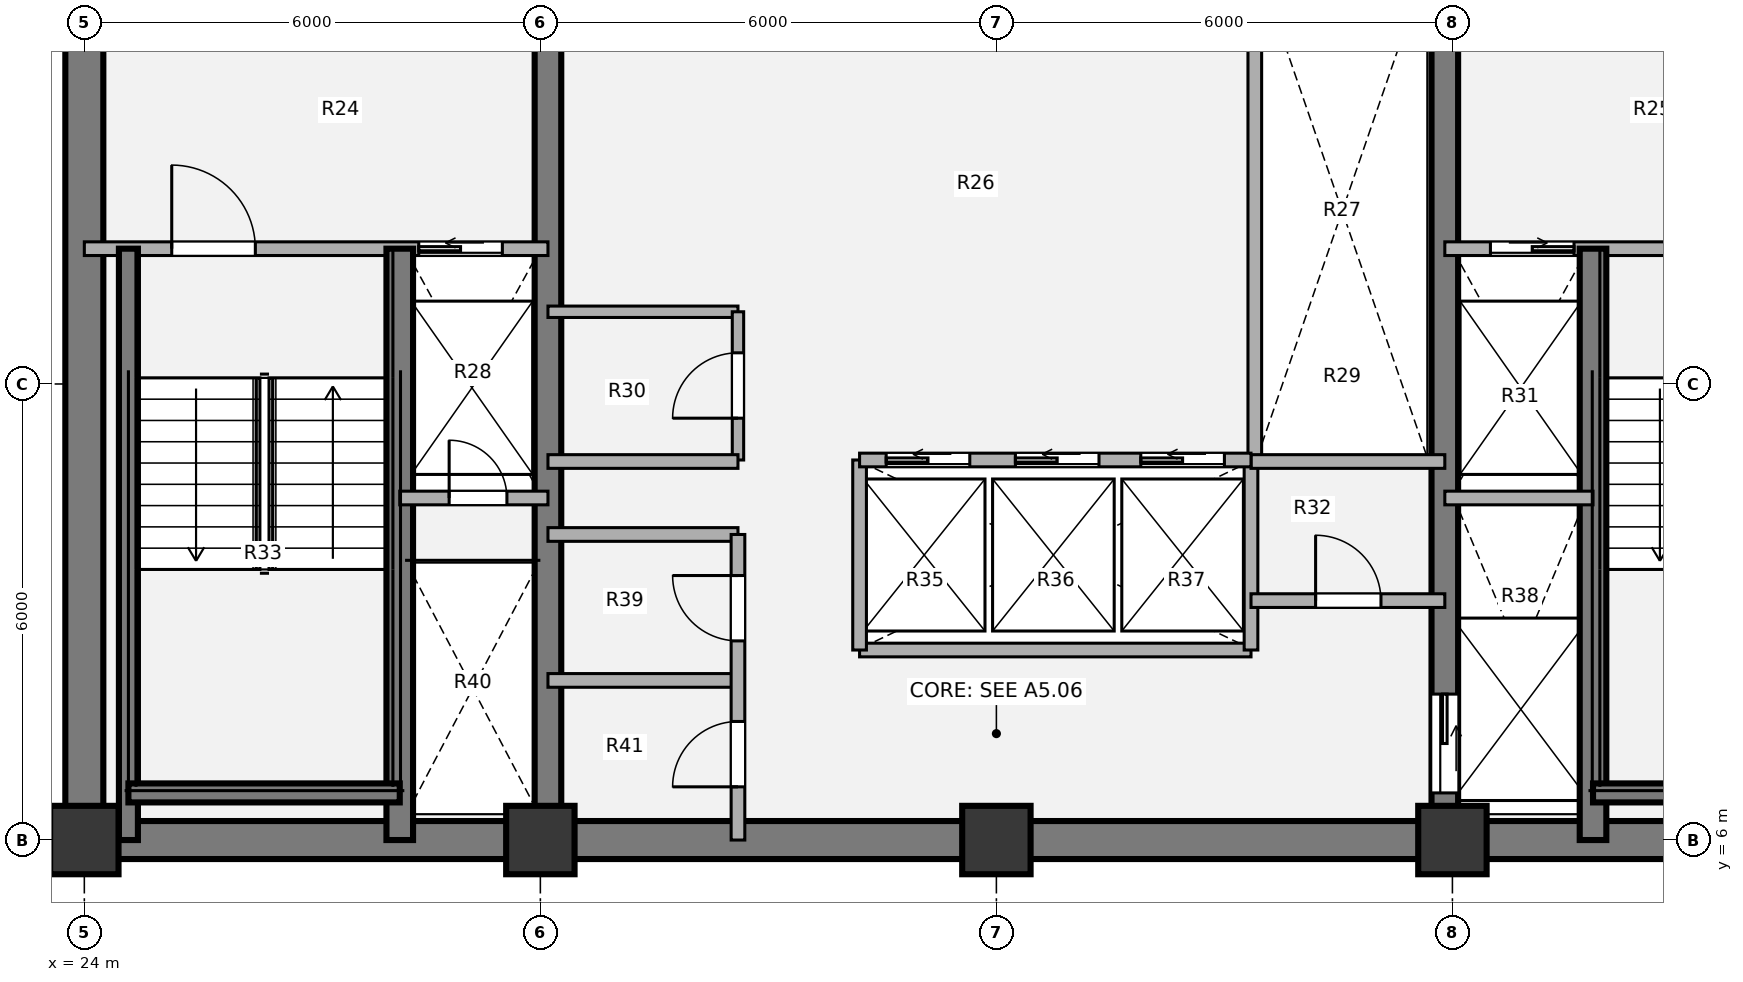
"""IFC4 building model, lengths in metres.
Left out: names, types, materials, properties, quantities, classifications, styles, units other than length and angle.
Written with IfcOpenShell. Run it as: python <this file> out.ifc"""

import sys

from ifc_helpers import new_model, si_unit, direction, frame, frame_2d, origin, origin_2d, place, context, subcontext, project, spatial, rectangle, extrude, source, transform, mapped, element, fill, save


model = new_model("IFC4")
c1 = context("Model", 3, precision=1e-05, world=origin(), true_north=direction((0.0, 1.0)))
c2 = subcontext(c1, "Body", "Model", "MODEL_VIEW")
j1 = project(units=[si_unit("LENGTHUNIT", "METRE"), si_unit("PLANEANGLEUNIT", "RADIAN")], contexts=[c1])
p1 = place(None, origin())
s1 = spatial("IfcSite", under=j1, at=p1, CompositionType="ELEMENT")
p2 = place(p1, origin())
s2 = spatial("IfcBuilding", under=s1, at=p2, CompositionType="ELEMENT")
p3 = place(p2, frame((0.0, 0.0, 93.6)))
s3 = spatial("IfcBuildingStorey", under=s2, at=p3, CompositionType="ELEMENT", Elevation=93.6)
m1 = source(origin(), c2, "Body", "SweptSolid", [
    extrude(rectangle(XDim=0.9, YDim=0.9, at=origin_2d()), origin(), (0.0, 0.0, 1.0), 3.78),
])
for number, where, z_axis, x_axis in (
    (1, (24.0, 6.0, 0.0), (0.0, 0.0, 1.0), (1.0, 0.0, 0.0)),
    (2, (30.0, 6.0, 0.0), (0.0, 0.0, 1.0), (1.0, 0.0, 0.0)),
    (3, (36.0, 6.0, 0.0), (0.0, 0.0, 1.0), (1.0, 0.0, 0.0)),
    (4, (42.0, 6.0, 0.0), (0.0, 0.0, 1.0), (1.0, 0.0, 0.0)),
):
    element("IfcColumn", number, at=place(p3, frame(where, z_axis=z_axis, x_axis=x_axis)), inside=s3, PredefinedType="COLUMN", context=c2, shape_type="MappedRepresentation", body=[
        mapped(m1, transform((0.0, 0.0, 0.0), x_axis=(1.0, 0.0, 0.0), y_axis=(0.0, 1.0, 0.0), z_axis=(0.0, 0.0, 1.0), scale=1.0)),
    ])
p4 = place(p3, frame((48.25, 6.0, 0.0), z_axis=(0.0, 0.0, 1.0), x_axis=(-1.0, 0.0, 0.0)))
e5 = element("IfcWall", 5, at=p4, inside=s3, PredefinedType="SHEAR", context=c2, shape_type="SweptSolid", body=[
    extrude(rectangle(XDim=24.5, YDim=0.5, at=frame_2d((12.25, 0.0))), origin(), (0.0, 0.0, 1.0), 3.78),
])
p5 = place(p3, frame((24.0, 6.0, 0.0), z_axis=(0.0, 0.0, 1.0), x_axis=(0.0, 1.0, 0.0)))
e6 = element("IfcWall", 6, at=p5, inside=s3, PredefinedType="SHEAR", context=c2, shape_type="SweptSolid", body=[
    extrude(rectangle(XDim=12.0, YDim=0.5, at=frame_2d((6.0, 0.0))), origin(), (0.0, 0.0, 1.0), 3.78),
])
p6 = place(p3, frame((30.1, 6.0, 0.0), z_axis=(0.0, 0.0, 1.0), x_axis=(0.0, 1.0, 0.0)))
e7 = element("IfcWall", 7, at=p6, inside=s3, PredefinedType="SHEAR", context=c2, shape_type="SweptSolid", body=[
    extrude(rectangle(XDim=12.0, YDim=0.35, at=frame_2d((6.0, 0.0))), origin(), (0.0, 0.0, 1.0), 3.78),
])
p7 = place(p3, frame((41.9, 18.0, 0.0), z_axis=(0.0, 0.0, 1.0), x_axis=(0.0, -1.0, 0.0)))
e8 = element("IfcWall", 8, at=p7, inside=s3, PredefinedType="SHEAR", context=c2, shape_type="SweptSolid", body=[
    extrude(rectangle(XDim=12.0, YDim=0.35, at=frame_2d((6.0, 0.0))), origin(), (0.0, 0.0, 1.0), 3.78),
])
p8 = place(p7, frame((10.08, 0.0, 0.0)))
e9 = element("IfcOpeningElement", 9, at=p8, cuts=e8, PredefinedType="OPENING", context=c2, shape_type="SweptSolid", body=[
    extrude(rectangle(XDim=1.3, YDim=2.1, at=origin_2d()), frame((0.65, 0.185, 1.05), z_axis=(0.0, -1.0, 0.0), x_axis=(1.0, 0.0, 0.0)), (0.0, 0.0, 1.0), 0.37),
])
p9 = place(p3, frame((30.1, 12.95, 0.0), z_axis=(0.0, 0.0, 1.0), x_axis=(1.0, 0.0, 0.0)))
e10 = element("IfcWall", 10, at=p9, inside=s3, PredefinedType="PARTITIONING", context=c2, shape_type="SweptSolid", body=[
    extrude(rectangle(XDim=2.5, YDim=0.15, at=frame_2d((1.25, 0.0))), origin(), (0.0, 0.0, 1.0), 3.5),
])
p10 = place(p3, frame((32.6, 11.0, 0.0), z_axis=(0.0, 0.0, 1.0), x_axis=(0.0, 1.0, 0.0)))
e11 = element("IfcWall", 11, at=p10, inside=s3, PredefinedType="PARTITIONING", context=c2, shape_type="SweptSolid", body=[
    extrude(rectangle(XDim=1.95, YDim=0.15, at=frame_2d((0.975, 0.0))), origin(), (0.0, 0.0, 1.0), 3.5),
])
p11 = place(p10, frame((0.55, 0.0, 0.0)))
e12 = element("IfcOpeningElement", 12, at=p11, cuts=e11, PredefinedType="OPENING", context=c2, shape_type="SweptSolid", body=[
    extrude(rectangle(XDim=0.86, YDim=2.1, at=origin_2d()), frame((0.43, 0.085, 1.05), z_axis=(0.0, -1.0, 0.0), x_axis=(1.0, 0.0, 0.0)), (0.0, 0.0, 1.0), 0.17),
])
p12 = place(p3, frame((34.2, 8.5, 0.0), z_axis=(0.0, 0.0, 1.0), x_axis=(1.0, 0.0, 0.0)))
e13 = element("IfcWall", 13, at=p12, inside=s3, PredefinedType="PARTITIONING", context=c2, shape_type="SweptSolid", body=[
    extrude(rectangle(XDim=5.15, YDim=0.18, at=frame_2d((2.575, 0.0))), origin(), (0.0, 0.0, 1.0), 3.5),
])
for number, where, z_axis, x_axis in (
    (14, (34.2, 8.5, 0.0), (0.0, 0.0, 1.0), (0.0, 1.0, 0.0)),
    (15, (39.35, 8.5, 0.0), (0.0, 0.0, 1.0), (0.0, 1.0, 0.0)),
):
    element("IfcWall", number, at=place(p3, frame(where, z_axis=z_axis, x_axis=x_axis)), inside=s3, PredefinedType="PARTITIONING", context=c2, shape_type="SweptSolid", body=[
        extrude(rectangle(XDim=2.5, YDim=0.18, at=frame_2d((1.25, 0.0))), origin(), (0.0, 0.0, 1.0), 3.5),
    ])
p13 = place(p3, frame((39.4, 11.0, 0.0), z_axis=(0.0, 0.0, 1.0), x_axis=(0.0, 1.0, 0.0)))
e16 = element("IfcWall", 16, at=p13, inside=s3, PredefinedType="PARTITIONING", context=c2, shape_type="SweptSolid", body=[
    extrude(rectangle(XDim=7.0, YDim=0.18, at=frame_2d((3.5, 0.0))), origin(), (0.0, 0.0, 1.0), 3.5),
])
p14 = place(p3, frame((30.1, 10.98, 0.0), z_axis=(0.0, 0.0, 1.0), x_axis=(1.0, 0.0, 0.0)))
e17 = element("IfcWall", 17, at=p14, inside=s3, PredefinedType="PARTITIONING", context=c2, shape_type="SweptSolid", body=[
    extrude(rectangle(XDim=2.5, YDim=0.18, at=frame_2d((1.25, 0.0))), origin(), (0.0, 0.0, 1.0), 3.5),
])
p15 = place(p3, frame((39.35, 10.98, 0.0), z_axis=(0.0, 0.0, 1.0), x_axis=(1.0, 0.0, 0.0)))
e18 = element("IfcWall", 18, at=p15, inside=s3, PredefinedType="PARTITIONING", context=c2, shape_type="SweptSolid", body=[
    extrude(rectangle(XDim=2.55, YDim=0.18, at=frame_2d((1.275, 0.0))), origin(), (0.0, 0.0, 1.0), 3.5),
])
for number, where, z_axis, x_axis in (
    (19, (30.1, 8.1, 0.0), (0.0, 0.0, 1.0), (1.0, 0.0, 0.0)),
    (20, (30.1, 10.02, 0.0), (0.0, 0.0, 1.0), (1.0, 0.0, 0.0)),
):
    element("IfcWall", number, at=place(p3, frame(where, z_axis=z_axis, x_axis=x_axis)), inside=s3, PredefinedType="PARTITIONING", context=c2, shape_type="SweptSolid", body=[
        extrude(rectangle(XDim=2.5, YDim=0.18, at=frame_2d((1.25, 0.0))), origin(), (0.0, 0.0, 1.0), 3.5),
    ])
p16 = place(p3, frame((32.6, 6.0, 0.0), z_axis=(0.0, 0.0, 1.0), x_axis=(0.0, 1.0, 0.0)))
e21 = element("IfcWall", 21, at=p16, inside=s3, PredefinedType="PARTITIONING", context=c2, shape_type="SweptSolid", body=[
    extrude(rectangle(XDim=4.02, YDim=0.18, at=frame_2d((2.01, 0.0))), origin(), (0.0, 0.0, 1.0), 3.5),
])
p17 = place(p16, frame((0.7, 0.0, 0.0)))
e22 = element("IfcOpeningElement", 22, at=p17, cuts=e21, PredefinedType="OPENING", context=c2, shape_type="SweptSolid", body=[
    extrude(rectangle(XDim=0.86, YDim=2.1, at=origin_2d()), frame((0.43, 0.1, 1.05), z_axis=(0.0, -1.0, 0.0), x_axis=(1.0, 0.0, 0.0)), (0.0, 0.0, 1.0), 0.2),
])
p18 = place(p16, frame((2.62, 0.0, 0.0)))
e23 = element("IfcOpeningElement", 23, at=p18, cuts=e21, PredefinedType="OPENING", context=c2, shape_type="SweptSolid", body=[
    extrude(rectangle(XDim=0.86, YDim=2.1, at=origin_2d()), frame((0.43, 0.1, 1.05), z_axis=(0.0, -1.0, 0.0), x_axis=(1.0, 0.0, 0.0)), (0.0, 0.0, 1.0), 0.2),
])
p19 = place(p3, frame((39.35, 9.15, 0.0), z_axis=(0.0, 0.0, 1.0), x_axis=(1.0, 0.0, 0.0)))
e24 = element("IfcWall", 24, at=p19, inside=s3, PredefinedType="PARTITIONING", context=c2, shape_type="SweptSolid", body=[
    extrude(rectangle(XDim=2.55, YDim=0.18, at=frame_2d((1.275, 0.0))), origin(), (0.0, 0.0, 1.0), 3.5),
])
p20 = place(p19, frame((0.85, 0.0, 0.0)))
e25 = element("IfcOpeningElement", 25, at=p20, cuts=e24, PredefinedType="OPENING", context=c2, shape_type="SweptSolid", body=[
    extrude(rectangle(XDim=0.86, YDim=2.1, at=origin_2d()), frame((0.43, 0.1, 1.05), z_axis=(0.0, -1.0, 0.0), x_axis=(1.0, 0.0, 0.0)), (0.0, 0.0, 1.0), 0.2),
])
p21 = place(p3, frame((24.0, 13.78, 0.0), z_axis=(0.0, 0.0, 1.0), x_axis=(1.0, 0.0, 0.0)))
e26 = element("IfcWall", 26, at=p21, inside=s3, PredefinedType="PARTITIONING", context=c2, shape_type="SweptSolid", body=[
    extrude(rectangle(XDim=6.1, YDim=0.18, at=frame_2d((3.05, 0.0))), origin(), (0.0, 0.0, 1.0), 3.5),
])
p22 = place(p21, frame((1.15, 0.0, 0.0)))
e27 = element("IfcOpeningElement", 27, at=p22, cuts=e26, PredefinedType="OPENING", context=c2, shape_type="SweptSolid", body=[
    extrude(rectangle(XDim=1.1, YDim=2.1, at=origin_2d()), frame((0.55, 0.1, 1.05), z_axis=(0.0, -1.0, 0.0), x_axis=(1.0, 0.0, 0.0)), (0.0, 0.0, 1.0), 0.2),
])
p23 = place(p21, frame((4.4, 0.0, 0.0)))
e28 = element("IfcOpeningElement", 28, at=p23, cuts=e26, PredefinedType="OPENING", context=c2, shape_type="SweptSolid", body=[
    extrude(rectangle(XDim=1.1, YDim=2.1, at=origin_2d()), frame((0.55, 0.1, 1.05), z_axis=(0.0, -1.0, 0.0), x_axis=(1.0, 0.0, 0.0)), (0.0, 0.0, 1.0), 0.2),
])
p24 = place(p3, frame((28.15, 6.0, 0.0), z_axis=(0.0, 0.0, 1.0), x_axis=(0.0, 1.0, 0.0)))
e29 = element("IfcWall", 29, at=p24, inside=s3, PredefinedType="SHEAR", context=c2, shape_type="SweptSolid", body=[
    extrude(rectangle(XDim=7.78, YDim=0.35, at=frame_2d((3.89, 0.0))), origin(), (0.0, 0.0, 1.0), 3.85),
])
p25 = place(p3, frame((24.58, 6.0, 0.0), z_axis=(0.0, 0.0, 1.0), x_axis=(0.0, 1.0, 0.0)))
e30 = element("IfcWall", 30, at=p25, inside=s3, PredefinedType="SHEAR", context=c2, shape_type="SweptSolid", body=[
    extrude(rectangle(XDim=7.78, YDim=0.25, at=frame_2d((3.89, 0.0))), origin(), (0.0, 0.0, 1.0), 3.85),
])
p26 = place(p3, frame((24.58, 6.62, 0.0), z_axis=(0.0, 0.0, 1.0), x_axis=(1.0, 0.0, 0.0)))
e31 = element("IfcWall", 31, at=p26, inside=s3, PredefinedType="SHEAR", context=c2, shape_type="SweptSolid", body=[
    extrude(rectangle(XDim=3.57, YDim=0.25, at=frame_2d((1.785, 0.0))), origin(), (0.0, 0.0, 1.0), 3.85),
])
p27 = place(p3, frame((28.15, 10.5, 0.0), z_axis=(0.0, 0.0, 1.0), x_axis=(1.0, 0.0, 0.0)))
e32 = element("IfcWall", 32, at=p27, inside=s3, PredefinedType="PARTITIONING", context=c2, shape_type="SweptSolid", body=[
    extrude(rectangle(XDim=1.95, YDim=0.18, at=frame_2d((0.975, 0.0))), origin(), (0.0, 0.0, 1.0), 3.5),
])
p28 = place(p27, frame((0.65, 0.0, 0.0)))
e33 = element("IfcOpeningElement", 33, at=p28, cuts=e32, PredefinedType="OPENING", context=c2, shape_type="SweptSolid", body=[
    extrude(rectangle(XDim=0.76, YDim=2.05, at=origin_2d()), frame((0.38, 0.1, 1.025), z_axis=(0.0, -1.0, 0.0), x_axis=(1.0, 0.0, 0.0)), (0.0, 0.0, 1.0), 0.2),
])
p29 = place(p3, frame((41.9, 13.78, 0.0), z_axis=(0.0, 0.0, 1.0), x_axis=(1.0, 0.0, 0.0)))
e34 = element("IfcWall", 34, at=p29, inside=s3, PredefinedType="PARTITIONING", context=c2, shape_type="SweptSolid", body=[
    extrude(rectangle(XDim=6.1, YDim=0.18, at=frame_2d((3.05, 0.0))), origin(), (0.0, 0.0, 1.0), 3.5),
])
p30 = place(p29, frame((0.6, 0.0, 0.0)))
e35 = element("IfcOpeningElement", 35, at=p30, cuts=e34, PredefinedType="OPENING", context=c2, shape_type="SweptSolid", body=[
    extrude(rectangle(XDim=1.1, YDim=2.1, at=origin_2d()), frame((0.55, 0.1, 1.05), z_axis=(0.0, -1.0, 0.0), x_axis=(1.0, 0.0, 0.0)), (0.0, 0.0, 1.0), 0.2),
])
p31 = place(p29, frame((3.8, 0.0, 0.0)))
e36 = element("IfcOpeningElement", 36, at=p31, cuts=e34, PredefinedType="OPENING", context=c2, shape_type="SweptSolid", body=[
    extrude(rectangle(XDim=1.1, YDim=2.1, at=origin_2d()), frame((0.55, 0.1, 1.05), z_axis=(0.0, -1.0, 0.0), x_axis=(1.0, 0.0, 0.0)), (0.0, 0.0, 1.0), 0.2),
])
p32 = place(p3, frame((43.85, 6.0, 0.0), z_axis=(0.0, 0.0, 1.0), x_axis=(0.0, 1.0, 0.0)))
e37 = element("IfcWall", 37, at=p32, inside=s3, PredefinedType="SHEAR", context=c2, shape_type="SweptSolid", body=[
    extrude(rectangle(XDim=7.78, YDim=0.35, at=frame_2d((3.89, 0.0))), origin(), (0.0, 0.0, 1.0), 3.85),
])
p33 = place(p3, frame((43.85, 6.62, 0.0), z_axis=(0.0, 0.0, 1.0), x_axis=(1.0, 0.0, 0.0)))
e38 = element("IfcWall", 38, at=p33, inside=s3, PredefinedType="SHEAR", context=c2, shape_type="SweptSolid", body=[
    extrude(rectangle(XDim=3.57, YDim=0.25, at=frame_2d((1.785, 0.0))), origin(), (0.0, 0.0, 1.0), 3.85),
])
p34 = place(p3, frame((41.9, 10.5, 0.0), z_axis=(0.0, 0.0, 1.0), x_axis=(1.0, 0.0, 0.0)))
e39 = element("IfcWall", 39, at=p34, inside=s3, PredefinedType="PARTITIONING", context=c2, shape_type="SweptSolid", body=[
    extrude(rectangle(XDim=1.95, YDim=0.18, at=frame_2d((0.975, 0.0))), origin(), (0.0, 0.0, 1.0), 3.5),
])
p35 = place(p3, frame((34.2, 11.0, 0.0), z_axis=(0.0, 0.0, 1.0), x_axis=(1.0, 0.0, 0.0)))
e40 = element("IfcWall", 40, at=p35, inside=s3, PredefinedType="PARTITIONING", context=c2, shape_type="SweptSolid", body=[
    extrude(rectangle(XDim=5.15, YDim=0.18, at=frame_2d((2.575, 0.0))), origin(), (0.0, 0.0, 1.0), 3.5),
])
p36 = place(p35, frame((0.35, 0.0, 0.0)))
e41 = element("IfcOpeningElement", 41, at=p36, cuts=e40, PredefinedType="OPENING", context=c2, shape_type="SweptSolid", body=[
    extrude(rectangle(XDim=1.1, YDim=2.1, at=origin_2d()), frame((0.55, 0.1, 1.05), z_axis=(0.0, -1.0, 0.0), x_axis=(1.0, 0.0, 0.0)), (0.0, 0.0, 1.0), 0.2),
])
p37 = place(p35, frame((2.05, 0.0, 0.0)))
e42 = element("IfcOpeningElement", 42, at=p37, cuts=e40, PredefinedType="OPENING", context=c2, shape_type="SweptSolid", body=[
    extrude(rectangle(XDim=1.1, YDim=2.1, at=origin_2d()), frame((0.55, 0.1, 1.05), z_axis=(0.0, -1.0, 0.0), x_axis=(1.0, 0.0, 0.0)), (0.0, 0.0, 1.0), 0.2),
])
p38 = place(p35, frame((3.7, 0.0, 0.0)))
e43 = element("IfcOpeningElement", 43, at=p38, cuts=e40, PredefinedType="OPENING", context=c2, shape_type="SweptSolid", body=[
    extrude(rectangle(XDim=1.1, YDim=2.1, at=origin_2d()), frame((0.55, 0.1, 1.05), z_axis=(0.0, -1.0, 0.0), x_axis=(1.0, 0.0, 0.0)), (0.0, 0.0, 1.0), 0.2),
])
m2 = source(origin(), c2, "Body", "SweptSolid", [
    extrude(rectangle(XDim=0.86, YDim=2.1, at=origin_2d()), frame((0.43, 0.025, 1.05), z_axis=(0.0, -1.0, 0.0), x_axis=(1.0, 0.0, 0.0)), (0.0, 0.0, 1.0), 0.05),
])
p39 = place(p11, origin())
e44 = element("IfcDoor", 44, at=p39, inside=s3, OperationType="SINGLE_SWING_LEFT", PredefinedType="DOOR", context=c2, shape_type="MappedRepresentation", body=[
    mapped(m2, transform((0.0, 0.0, 0.0), x_axis=(1.0, 0.0, 0.0), y_axis=(0.0, 1.0, 0.0), z_axis=(0.0, 0.0, 1.0), scale=1.0)),
])
fill(e12, e44)
p40 = place(p17, origin())
e45 = element("IfcDoor", 45, at=p40, inside=s3, OperationType="SINGLE_SWING_LEFT", PredefinedType="DOOR", context=c2, shape_type="MappedRepresentation", body=[
    mapped(m2, transform((0.0, 0.0, 0.0), x_axis=(1.0, 0.0, 0.0), y_axis=(0.0, 1.0, 0.0), z_axis=(0.0, 0.0, 1.0), scale=1.0)),
])
fill(e22, e45)
p41 = place(p18, origin())
e46 = element("IfcDoor", 46, at=p41, inside=s3, OperationType="SINGLE_SWING_RIGHT", PredefinedType="DOOR", context=c2, shape_type="MappedRepresentation", body=[
    mapped(m2, transform((0.0, 0.0, 0.0), x_axis=(1.0, 0.0, 0.0), y_axis=(0.0, 1.0, 0.0), z_axis=(0.0, 0.0, 1.0), scale=1.0)),
])
fill(e23, e46)
p42 = place(p20, origin())
e47 = element("IfcDoor", 47, at=p42, inside=s3, OperationType="SINGLE_SWING_LEFT", PredefinedType="DOOR", context=c2, shape_type="MappedRepresentation", body=[
    mapped(m2, transform((0.0, 0.0, 0.0), x_axis=(1.0, 0.0, 0.0), y_axis=(0.0, 1.0, 0.0), z_axis=(0.0, 0.0, 1.0), scale=1.0)),
])
fill(e25, e47)
m3 = source(origin(), c2, "Body", "SweptSolid", [
    extrude(rectangle(XDim=1.1, YDim=2.1, at=origin_2d()), frame((0.55, 0.025, 1.05), z_axis=(0.0, -1.0, 0.0), x_axis=(1.0, 0.0, 0.0)), (0.0, 0.0, 1.0), 0.05),
])
p43 = place(p22, origin())
e48 = element("IfcDoor", 48, at=p43, inside=s3, OperationType="SINGLE_SWING_LEFT", PredefinedType="DOOR", context=c2, shape_type="MappedRepresentation", body=[
    mapped(m3, transform((0.0, 0.0, 0.0), x_axis=(1.0, 0.0, 0.0), y_axis=(0.0, 1.0, 0.0), z_axis=(0.0, 0.0, 1.0), scale=1.0)),
])
fill(e27, e48)
m4 = source(origin(), c2, "Body", "SweptSolid", [
    extrude(rectangle(XDim=1.1, YDim=2.1, at=origin_2d()), frame((0.55, 0.025, 1.05), z_axis=(0.0, -1.0, 0.0), x_axis=(1.0, 0.0, 0.0)), (0.0, 0.0, 1.0), 0.05),
])
p44 = place(p23, origin())
e49 = element("IfcDoor", 49, at=p44, inside=s3, OperationType="SLIDING_TO_LEFT", PredefinedType="DOOR", context=c2, shape_type="MappedRepresentation", body=[
    mapped(m4, transform((0.0, 0.0, 0.0), x_axis=(1.0, 0.0, 0.0), y_axis=(0.0, 1.0, 0.0), z_axis=(0.0, 0.0, 1.0), scale=1.0)),
])
fill(e28, e49)
m5 = source(origin(), c2, "Body", "SweptSolid", [
    extrude(rectangle(XDim=0.76, YDim=2.05, at=origin_2d()), frame((0.38, 0.025, 1.025), z_axis=(0.0, -1.0, 0.0), x_axis=(1.0, 0.0, 0.0)), (0.0, 0.0, 1.0), 0.05),
])
p45 = place(p28, origin())
e50 = element("IfcDoor", 50, at=p45, inside=s3, OperationType="SINGLE_SWING_LEFT", PredefinedType="DOOR", context=c2, shape_type="MappedRepresentation", body=[
    mapped(m5, transform((0.0, 0.0, 0.0), x_axis=(1.0, 0.0, 0.0), y_axis=(0.0, 1.0, 0.0), z_axis=(0.0, 0.0, 1.0), scale=1.0)),
])
fill(e33, e50)
p46 = place(p30, origin())
e51 = element("IfcDoor", 51, at=p46, inside=s3, OperationType="SLIDING_TO_RIGHT", PredefinedType="DOOR", context=c2, shape_type="MappedRepresentation", body=[
    mapped(m4, transform((0.0, 0.0, 0.0), x_axis=(1.0, 0.0, 0.0), y_axis=(0.0, 1.0, 0.0), z_axis=(0.0, 0.0, 1.0), scale=1.0)),
])
fill(e35, e51)
m6 = source(origin(), c2, "Body", "SweptSolid", [
    extrude(rectangle(XDim=1.3, YDim=2.1, at=origin_2d()), frame((0.65, 0.025, 1.05), z_axis=(0.0, -1.0, 0.0), x_axis=(1.0, 0.0, 0.0)), (0.0, 0.0, 1.0), 0.05),
])
p47 = place(p8, origin())
e52 = element("IfcDoor", 52, at=p47, inside=s3, OperationType="SLIDING_TO_LEFT", PredefinedType="DOOR", context=c2, shape_type="MappedRepresentation", body=[
    mapped(m6, transform((0.0, 0.0, 0.0), x_axis=(1.0, 0.0, 0.0), y_axis=(0.0, 1.0, 0.0), z_axis=(0.0, 0.0, 1.0), scale=1.0)),
])
fill(e9, e52)
p48 = place(p36, origin())
e53 = element("IfcDoor", 53, at=p48, inside=s3, OperationType="SLIDING_TO_LEFT", PredefinedType="DOOR", context=c2, shape_type="MappedRepresentation", body=[
    mapped(m4, transform((0.0, 0.0, 0.0), x_axis=(1.0, 0.0, 0.0), y_axis=(0.0, 1.0, 0.0), z_axis=(0.0, 0.0, 1.0), scale=1.0)),
])
fill(e41, e53)
p49 = place(p37, origin())
e54 = element("IfcDoor", 54, at=p49, inside=s3, OperationType="SLIDING_TO_LEFT", PredefinedType="DOOR", context=c2, shape_type="MappedRepresentation", body=[
    mapped(m4, transform((0.0, 0.0, 0.0), x_axis=(1.0, 0.0, 0.0), y_axis=(0.0, 1.0, 0.0), z_axis=(0.0, 0.0, 1.0), scale=1.0)),
])
fill(e42, e54)
p50 = place(p38, origin())
e55 = element("IfcDoor", 55, at=p50, inside=s3, OperationType="SLIDING_TO_LEFT", PredefinedType="DOOR", context=c2, shape_type="MappedRepresentation", body=[
    mapped(m4, transform((0.0, 0.0, 0.0), x_axis=(1.0, 0.0, 0.0), y_axis=(0.0, 1.0, 0.0), z_axis=(0.0, 0.0, 1.0), scale=1.0)),
])
fill(e43, e55)
save(model, sys.argv[1])
